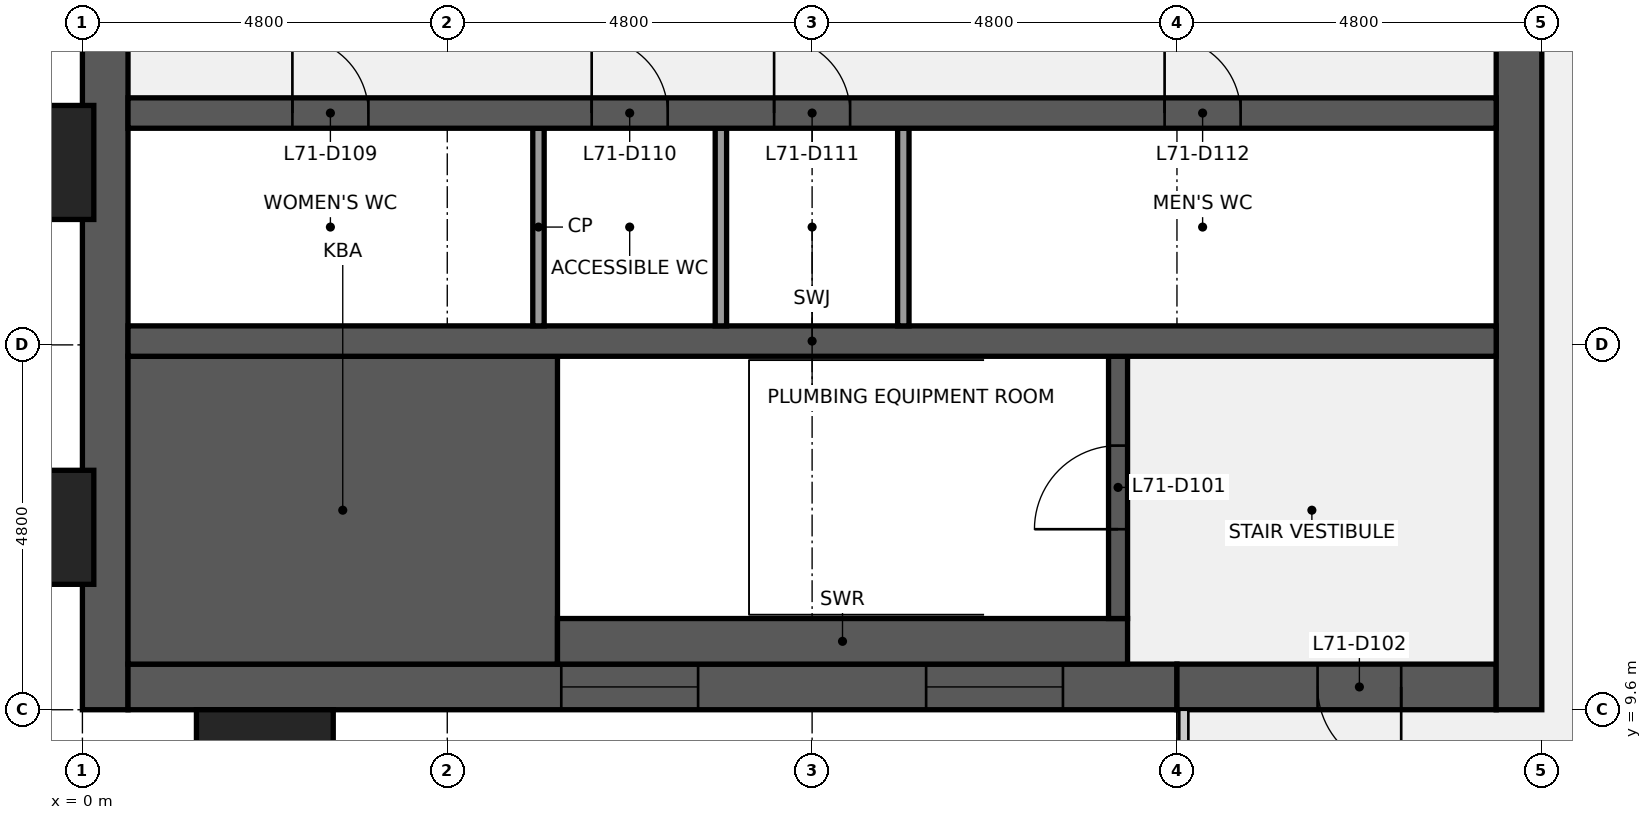
"""IFC4 building model, lengths in metres.
Left out: names, types, materials, properties, quantities, classifications, styles, units other than length and angle.
Written with IfcOpenShell. Run it as: python <this file> out.ifc"""

import sys

from ifc_helpers import new_model, si_unit, direction, frame, frame_2d, origin, origin_2d, place, context, subcontext, project, spatial, rectangle, extrude, element, fill, save


model = new_model("IFC4")
c1 = context("Model", 3, precision=1e-05, world=origin(), true_north=direction((0.0, 1.0)))
c2 = subcontext(c1, "Body", "Model", "MODEL_VIEW")
j1 = project(units=[si_unit("LENGTHUNIT", "METRE"), si_unit("PLANEANGLEUNIT", "RADIAN")], contexts=[c1])
p1 = place(None, origin())
s1 = spatial("IfcSite", under=j1, at=p1, CompositionType="ELEMENT")
p2 = place(p1, origin())
s2 = spatial("IfcBuilding", under=s1, at=p2, CompositionType="ELEMENT")
p3 = place(p2, frame((0.0, 0.0, 322.3)))
s3 = spatial("IfcBuildingStorey", under=s2, at=p3, CompositionType="ELEMENT", Elevation=322.3)
p4 = place(p3, frame((0.3, 9.6, 0.0), z_axis=(0.0, 0.0, 1.0), x_axis=(0.0, 1.0, 0.0)))
e1 = element("IfcWall", 1, at=p4, inside=s3, PredefinedType="SHEAR", context=c2, shape_type="SweptSolid", body=[
    extrude(rectangle(XDim=28.8, YDim=0.6, at=frame_2d((14.4, 0.0))), origin(), (0.0, 0.0, 1.0), 3.84),
])
p5 = place(p4, frame((8.85, 0.0, 0.9)))
e2 = element("IfcOpeningElement", 2, at=p5, cuts=e1, PredefinedType="OPENING", context=c2, shape_type="SweptSolid", body=[
    extrude(rectangle(XDim=1.5, YDim=1.5, at=frame_2d((0.75, 0.75))), frame((0.0, 0.31, 0.0), z_axis=(0.0, -1.0, 0.0), x_axis=(1.0, 0.0, 0.0)), (0.0, 0.0, 1.0), 0.62),
])
p6 = place(p4, frame((18.45, 0.0, 0.9)))
e3 = element("IfcOpeningElement", 3, at=p6, cuts=e1, PredefinedType="OPENING", context=c2, shape_type="SweptSolid", body=[
    extrude(rectangle(XDim=1.5, YDim=1.5, at=frame_2d((0.75, 0.75))), frame((0.0, 0.31, 0.0), z_axis=(0.0, -1.0, 0.0), x_axis=(1.0, 0.0, 0.0)), (0.0, 0.0, 1.0), 0.62),
])
p7 = place(p3, frame((14.4, 9.9, 0.0), z_axis=(0.0, 0.0, 1.0), x_axis=(-1.0, 0.0, 0.0)))
e4 = element("IfcWall", 4, at=p7, inside=s3, PredefinedType="SHEAR", context=c2, shape_type="SweptSolid", body=[
    extrude(rectangle(XDim=13.8, YDim=0.6, at=frame_2d((6.9, 0.0))), origin(), (0.0, 0.0, 1.0), 3.84),
])
p8 = place(p7, frame((6.3, 0.0, 0.9)))
e5 = element("IfcOpeningElement", 5, at=p8, cuts=e4, PredefinedType="OPENING", context=c2, shape_type="SweptSolid", body=[
    extrude(rectangle(XDim=1.8, YDim=1.5, at=frame_2d((0.9, 0.75))), frame((0.0, 0.31, 0.0), z_axis=(0.0, -1.0, 0.0), x_axis=(1.0, 0.0, 0.0)), (0.0, 0.0, 1.0), 0.62),
])
p9 = place(p7, frame((1.5, 0.0, 0.9)))
e6 = element("IfcOpeningElement", 6, at=p9, cuts=e4, PredefinedType="OPENING", context=c2, shape_type="SweptSolid", body=[
    extrude(rectangle(XDim=1.8, YDim=1.5, at=frame_2d((0.9, 0.75))), frame((0.0, 0.31, 0.0), z_axis=(0.0, -1.0, 0.0), x_axis=(1.0, 0.0, 0.0)), (0.0, 0.0, 1.0), 0.62),
])
p10 = place(p3, frame((18.6, 9.9, 0.0), z_axis=(0.0, 0.0, 1.0), x_axis=(-1.0, 0.0, 0.0)))
e7 = element("IfcWall", 7, at=p10, inside=s3, PredefinedType="SHEAR", context=c2, shape_type="SweptSolid", body=[
    extrude(rectangle(XDim=4.2, YDim=0.6, at=frame_2d((2.1, 0.0))), origin(), (0.0, 0.0, 1.0), 3.84),
])
p11 = place(p10, frame((1.25, 0.0, 0.0)))
e8 = element("IfcOpeningElement", 8, at=p11, cuts=e7, PredefinedType="OPENING", context=c2, shape_type="SweptSolid", body=[
    extrude(rectangle(XDim=1.1, YDim=2.1, at=frame_2d((0.55, 1.05))), frame((0.0, 0.31, 0.0), z_axis=(0.0, -1.0, 0.0), x_axis=(1.0, 0.0, 0.0)), (0.0, 0.0, 1.0), 0.62),
])
p12 = place(p3, frame((18.9, 38.4, 0.0), z_axis=(0.0, 0.0, 1.0), x_axis=(0.0, -1.0, 0.0)))
e9 = element("IfcWall", 9, at=p12, inside=s3, PredefinedType="SHEAR", context=c2, shape_type="SweptSolid", body=[
    extrude(rectangle(XDim=28.8, YDim=0.6, at=frame_2d((14.4, 0.0))), origin(), (0.0, 0.0, 1.0), 3.84),
])
p13 = place(p12, frame((18.3, 0.0, 0.0)))
e10 = element("IfcOpeningElement", 10, at=p13, cuts=e9, PredefinedType="OPENING", context=c2, shape_type="SweptSolid", body=[
    extrude(rectangle(XDim=1.8, YDim=2.1, at=frame_2d((0.9, 1.05))), frame((0.0, 0.31, 0.0), z_axis=(0.0, -1.0, 0.0), x_axis=(1.0, 0.0, 0.0)), (0.0, 0.0, 1.0), 0.62),
])
p14 = place(p12, frame((8.7, 0.0, 0.0)))
e11 = element("IfcOpeningElement", 11, at=p14, cuts=e9, PredefinedType="OPENING", context=c2, shape_type="SweptSolid", body=[
    extrude(rectangle(XDim=1.8, YDim=2.1, at=frame_2d((0.9, 1.05))), frame((0.0, 0.31, 0.0), z_axis=(0.0, -1.0, 0.0), x_axis=(1.0, 0.0, 0.0)), (0.0, 0.0, 1.0), 0.62),
])
p15 = place(p3, frame((0.6, 12.225, 0.0), z_axis=(0.0, 0.0, 1.0), x_axis=(1.0, 0.0, 0.0)))
e12 = element("IfcWall", 12, at=p15, inside=s3, PredefinedType="SHEAR", context=c2, shape_type="SweptSolid", body=[
    extrude(rectangle(XDim=5.65, YDim=4.05, at=frame_2d((2.825, 0.0))), origin(), (0.0, 0.0, 1.0), 3.84),
])
p16 = place(p3, frame((6.25, 10.5, 0.0), z_axis=(0.0, 0.0, 1.0), x_axis=(1.0, 0.0, 0.0)))
e13 = element("IfcWall", 13, at=p16, inside=s3, PredefinedType="SHEAR", context=c2, shape_type="SweptSolid", body=[
    extrude(rectangle(XDim=7.5, YDim=0.6, at=frame_2d((3.75, 0.0))), origin(), (0.0, 0.0, 1.0), 3.84),
])
p17 = place(p3, frame((13.625, 10.8, 0.0), z_axis=(0.0, 0.0, 1.0), x_axis=(0.0, 1.0, 0.0)))
e14 = element("IfcWall", 14, at=p17, inside=s3, PredefinedType="SHEAR", context=c2, shape_type="SweptSolid", body=[
    extrude(rectangle(XDim=3.45, YDim=0.25, at=frame_2d((1.725, 0.0))), origin(), (0.0, 0.0, 1.0), 3.84),
])
p18 = place(p17, frame((1.175, 0.0, 0.0)))
e15 = element("IfcOpeningElement", 15, at=p18, cuts=e14, PredefinedType="OPENING", context=c2, shape_type="SweptSolid", body=[
    extrude(rectangle(XDim=1.1, YDim=2.1, at=frame_2d((0.55, 1.05))), frame((0.0, 0.135, 0.0), z_axis=(0.0, -1.0, 0.0), x_axis=(1.0, 0.0, 0.0)), (0.0, 0.0, 1.0), 0.27),
])
p19 = place(p3, frame((0.6, 14.45, 0.0), z_axis=(0.0, 0.0, 1.0), x_axis=(1.0, 0.0, 0.0)))
e16 = element("IfcWall", 16, at=p19, inside=s3, PredefinedType="SHEAR", context=c2, shape_type="SweptSolid", body=[
    extrude(rectangle(XDim=18.0, YDim=0.4, at=frame_2d((9.0, 0.0))), origin(), (0.0, 0.0, 1.0), 3.84),
])
for number, where, z_axis, x_axis in (
    (17, (6.0, 14.65, 0.0), (0.0, 0.0, 1.0), (0.0, 1.0, 0.0)),
    (18, (8.4, 14.65, 0.0), (0.0, 0.0, 1.0), (0.0, 1.0, 0.0)),
    (19, (10.8, 14.65, 0.0), (0.0, 0.0, 1.0), (0.0, 1.0, 0.0)),
):
    element("IfcWall", number, at=place(p3, frame(where, z_axis=z_axis, x_axis=x_axis)), inside=s3, PredefinedType="PARTITIONING", context=c2, shape_type="SweptSolid", body=[
        extrude(rectangle(XDim=2.6, YDim=0.15, at=frame_2d((1.3, 0.0))), origin(), (0.0, 0.0, 1.0), 3.84),
    ])
p20 = place(p3, frame((0.6, 17.45, 0.0), z_axis=(0.0, 0.0, 1.0), x_axis=(1.0, 0.0, 0.0)))
e20 = element("IfcWall", 20, at=p20, inside=s3, PredefinedType="SHEAR", context=c2, shape_type="SweptSolid", body=[
    extrude(rectangle(XDim=18.0, YDim=0.4, at=frame_2d((9.0, 0.0))), origin(), (0.0, 0.0, 1.0), 3.84),
])
p21 = place(p20, frame((2.163, 0.0, 0.0)))
e21 = element("IfcOpeningElement", 21, at=p21, cuts=e20, PredefinedType="OPENING", context=c2, shape_type="SweptSolid", body=[
    extrude(rectangle(XDim=1.0, YDim=2.1, at=frame_2d((0.5, 1.05))), frame((0.0, 0.21, 0.0), z_axis=(0.0, -1.0, 0.0), x_axis=(1.0, 0.0, 0.0)), (0.0, 0.0, 1.0), 0.42),
])
p22 = place(p20, frame((6.1, 0.0, 0.0)))
e22 = element("IfcOpeningElement", 22, at=p22, cuts=e20, PredefinedType="OPENING", context=c2, shape_type="SweptSolid", body=[
    extrude(rectangle(XDim=1.0, YDim=2.1, at=frame_2d((0.5, 1.05))), frame((0.0, 0.21, 0.0), z_axis=(0.0, -1.0, 0.0), x_axis=(1.0, 0.0, 0.0)), (0.0, 0.0, 1.0), 0.42),
])
p23 = place(p20, frame((8.5, 0.0, 0.0)))
e23 = element("IfcOpeningElement", 23, at=p23, cuts=e20, PredefinedType="OPENING", context=c2, shape_type="SweptSolid", body=[
    extrude(rectangle(XDim=1.0, YDim=2.1, at=frame_2d((0.5, 1.05))), frame((0.0, 0.21, 0.0), z_axis=(0.0, -1.0, 0.0), x_axis=(1.0, 0.0, 0.0)), (0.0, 0.0, 1.0), 0.42),
])
p24 = place(p20, frame((13.637, 0.0, 0.0)))
e24 = element("IfcOpeningElement", 24, at=p24, cuts=e20, PredefinedType="OPENING", context=c2, shape_type="SweptSolid", body=[
    extrude(rectangle(XDim=1.0, YDim=2.1, at=frame_2d((0.5, 1.05))), frame((0.0, 0.21, 0.0), z_axis=(0.0, -1.0, 0.0), x_axis=(1.0, 0.0, 0.0)), (0.0, 0.0, 1.0), 0.42),
])
for number, where, z_axis, x_axis in (
    (25, (-0.75, 12.0, 0.0), (0.0, 0.0, 1.0), (0.0, 1.0, 0.0)),
    (26, (-0.75, 16.8, 0.0), (0.0, 0.0, 1.0), (0.0, 1.0, 0.0)),
    (27, (2.4, 8.85, 0.0), (0.0, 0.0, 1.0), (1.0, 0.0, 0.0)),
):
    element("IfcColumn", number, at=place(p3, frame(where, z_axis=z_axis, x_axis=x_axis)), inside=s3, PredefinedType="PILASTER", context=c2, shape_type="SweptSolid", body=[
        extrude(rectangle(XDim=1.8, YDim=1.5, at=origin_2d()), origin(), (0.0, 0.0, 1.0), 4.0),
    ])
p25 = place(p18, origin())
e28 = element("IfcDoor", 28, at=p25, inside=s3, OperationType="SINGLE_SWING_LEFT", PredefinedType="DOOR", context=c2, shape_type="SweptSolid", body=[
    extrude(rectangle(XDim=1.1, YDim=2.1, at=frame_2d((0.55, 1.05))), frame((0.0, 0.025, 0.0), z_axis=(0.0, -1.0, 0.0), x_axis=(1.0, 0.0, 0.0)), (0.0, 0.0, 1.0), 0.05),
])
fill(e15, e28)
p26 = place(p11, origin())
e29 = element("IfcDoor", 29, at=p26, inside=s3, OperationType="SINGLE_SWING_LEFT", PredefinedType="DOOR", context=c2, shape_type="SweptSolid", body=[
    extrude(rectangle(XDim=1.1, YDim=2.1, at=frame_2d((0.55, 1.05))), frame((0.0, 0.025, 0.0), z_axis=(0.0, -1.0, 0.0), x_axis=(1.0, 0.0, 0.0)), (0.0, 0.0, 1.0), 0.05),
])
fill(e8, e29)
p27 = place(p21, origin())
e30 = element("IfcDoor", 30, at=p27, inside=s3, OperationType="SINGLE_SWING_LEFT", PredefinedType="DOOR", context=c2, shape_type="SweptSolid", body=[
    extrude(rectangle(XDim=1.0, YDim=2.1, at=frame_2d((0.5, 1.05))), frame((0.0, 0.025, 0.0), z_axis=(0.0, -1.0, 0.0), x_axis=(1.0, 0.0, 0.0)), (0.0, 0.0, 1.0), 0.05),
])
fill(e21, e30)
p28 = place(p22, origin())
e31 = element("IfcDoor", 31, at=p28, inside=s3, OperationType="SINGLE_SWING_LEFT", PredefinedType="DOOR", context=c2, shape_type="SweptSolid", body=[
    extrude(rectangle(XDim=1.0, YDim=2.1, at=frame_2d((0.5, 1.05))), frame((0.0, 0.025, 0.0), z_axis=(0.0, -1.0, 0.0), x_axis=(1.0, 0.0, 0.0)), (0.0, 0.0, 1.0), 0.05),
])
fill(e22, e31)
p29 = place(p23, origin())
e32 = element("IfcDoor", 32, at=p29, inside=s3, OperationType="SINGLE_SWING_LEFT", PredefinedType="DOOR", context=c2, shape_type="SweptSolid", body=[
    extrude(rectangle(XDim=1.0, YDim=2.1, at=frame_2d((0.5, 1.05))), frame((0.0, 0.025, 0.0), z_axis=(0.0, -1.0, 0.0), x_axis=(1.0, 0.0, 0.0)), (0.0, 0.0, 1.0), 0.05),
])
fill(e23, e32)
p30 = place(p24, origin())
e33 = element("IfcDoor", 33, at=p30, inside=s3, OperationType="SINGLE_SWING_LEFT", PredefinedType="DOOR", context=c2, shape_type="SweptSolid", body=[
    extrude(rectangle(XDim=1.0, YDim=2.1, at=frame_2d((0.5, 1.05))), frame((0.0, 0.025, 0.0), z_axis=(0.0, -1.0, 0.0), x_axis=(1.0, 0.0, 0.0)), (0.0, 0.0, 1.0), 0.05),
])
fill(e24, e33)
p31 = place(p8, origin())
e34 = element("IfcWindow", 34, at=p31, inside=s3, PartitioningType="SINGLE_PANEL", PredefinedType="WINDOW", context=c2, shape_type="SweptSolid", body=[
    extrude(rectangle(XDim=1.8, YDim=1.5, at=frame_2d((0.9, 0.75))), frame((0.0, 0.03, 0.0), z_axis=(0.0, -1.0, 0.0), x_axis=(1.0, 0.0, 0.0)), (0.0, 0.0, 1.0), 0.06),
])
fill(e5, e34)
p32 = place(p9, origin())
e35 = element("IfcWindow", 35, at=p32, inside=s3, PartitioningType="SINGLE_PANEL", PredefinedType="WINDOW", context=c2, shape_type="SweptSolid", body=[
    extrude(rectangle(XDim=1.8, YDim=1.5, at=frame_2d((0.9, 0.75))), frame((0.0, 0.03, 0.0), z_axis=(0.0, -1.0, 0.0), x_axis=(1.0, 0.0, 0.0)), (0.0, 0.0, 1.0), 0.06),
])
fill(e6, e35)
save(model, sys.argv[1])
